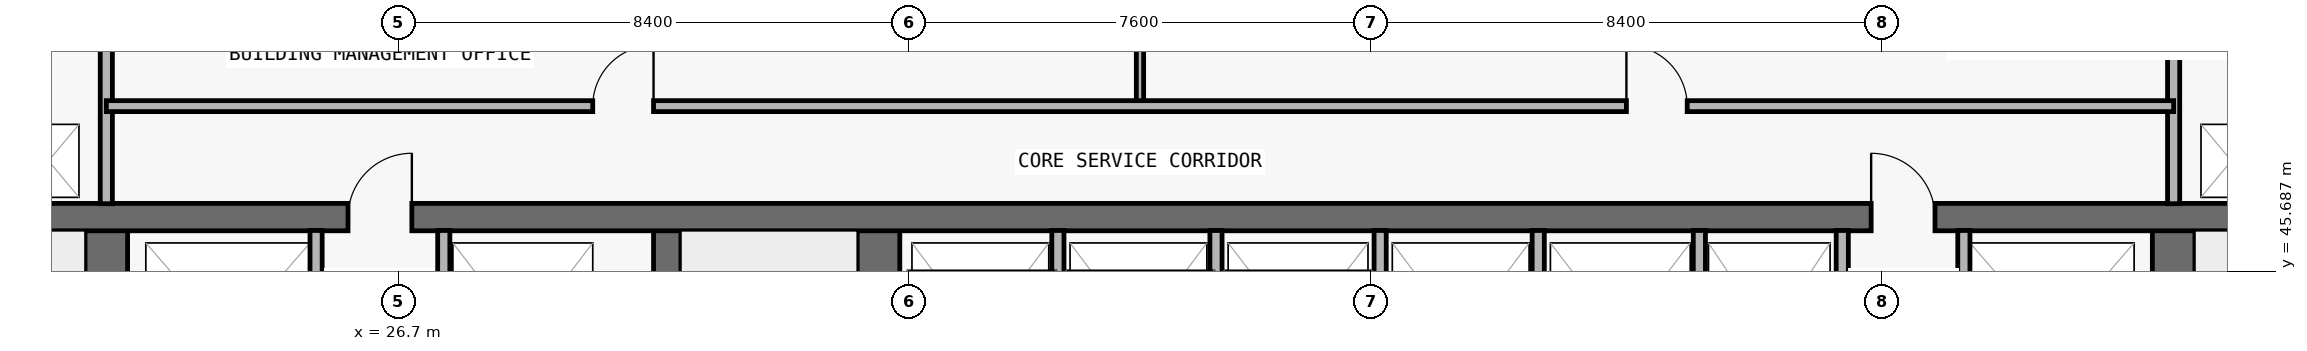
"""IFC4 building model, lengths in metres.
Left out: names, types, materials, properties, quantities, classifications, styles, units other than length and angle.
Written with IfcOpenShell. Run it as: python <this file> out.ifc"""

import sys

from ifc_helpers import new_model, si_unit, direction, frame, frame_2d, origin, place, context, subcontext, project, spatial, rectangle, extrude, element, fill, save


model = new_model("IFC4")
c1 = context("Model", 3, precision=1e-05, world=origin(), true_north=direction((0.0, 1.0)))
c2 = subcontext(c1, "Body", "Model", "MODEL_VIEW")
j1 = project(units=[si_unit("LENGTHUNIT", "METRE"), si_unit("PLANEANGLEUNIT", "RADIAN")], contexts=[c1])
p1 = place(None, origin())
s1 = spatial("IfcSite", under=j1, at=p1, CompositionType="ELEMENT")
p2 = place(p1, origin())
s2 = spatial("IfcBuilding", under=s1, at=p2, CompositionType="ELEMENT")
p3 = place(p2, frame((0.0, 0.0, 94.5)))
s3 = spatial("IfcBuildingStorey", under=s2, at=p3, CompositionType="ELEMENT", Elevation=94.5)
p4 = place(p3, frame((21.9, 36.95, 0.0), z_axis=(0.0, 0.0, 1.0), x_axis=(0.0, 1.0, 0.0)))
e1 = element("IfcWall", 1, at=p4, inside=s3, PredefinedType="SHEAR", context=c2, shape_type="SweptSolid", body=[
    extrude(rectangle(XDim=9.625, YDim=0.7, at=frame_2d((4.812, 0.0))), origin(), (0.0, 0.0, 1.0), 3.0),
])
p5 = place(p4, frame((0.6, 0.0, 0.0)))
e2 = element("IfcOpeningElement", 2, at=p5, cuts=e1, PredefinedType="OPENING", context=c2, shape_type="SweptSolid", body=[
    extrude(rectangle(XDim=1.1, YDim=2.15, at=frame_2d((0.55, 1.075))), frame((0.0, 0.36, 0.0), z_axis=(0.0, -1.0, 0.0), x_axis=(1.0, 0.0, 0.0)), (0.0, 0.0, 1.0), 0.72),
])
p6 = place(p3, frame((55.9, 36.95, 0.0), z_axis=(0.0, 0.0, 1.0), x_axis=(0.0, 1.0, 0.0)))
e3 = element("IfcWall", 3, at=p6, inside=s3, PredefinedType="SHEAR", context=c2, shape_type="SweptSolid", body=[
    extrude(rectangle(XDim=9.625, YDim=0.7, at=frame_2d((4.812, 0.0))), origin(), (0.0, 0.0, 1.0), 3.0),
])
p7 = place(p6, frame((0.6, 0.0, 0.0)))
e4 = element("IfcOpeningElement", 4, at=p7, cuts=e3, PredefinedType="OPENING", context=c2, shape_type="SweptSolid", body=[
    extrude(rectangle(XDim=1.1, YDim=2.15, at=frame_2d((0.55, 1.075))), frame((0.0, 0.36, 0.0), z_axis=(0.0, -1.0, 0.0), x_axis=(1.0, 0.0, 0.0)), (0.0, 0.0, 1.0), 0.72),
])
p8 = place(p3, frame((31.125, 36.95, 0.0), z_axis=(0.0, 0.0, 1.0), x_axis=(0.0, 1.0, 0.0)))
e5 = element("IfcWall", 5, at=p8, inside=s3, PredefinedType="SHEAR", context=c2, shape_type="SweptSolid", body=[
    extrude(rectangle(XDim=9.625, YDim=0.45, at=frame_2d((4.812, 0.0))), origin(), (0.0, 0.0, 1.0), 3.0),
])
p9 = place(p3, frame((34.6, 36.95, 0.0), z_axis=(0.0, 0.0, 1.0), x_axis=(0.0, 1.0, 0.0)))
e6 = element("IfcWall", 6, at=p9, inside=s3, PredefinedType="SHEAR", context=c2, shape_type="SweptSolid", body=[
    extrude(rectangle(XDim=9.625, YDim=0.7, at=frame_2d((4.812, 0.0))), origin(), (0.0, 0.0, 1.0), 3.0),
])
p10 = place(p3, frame((18.25, 46.575, 0.0), z_axis=(0.0, 0.0, 1.0), x_axis=(1.0, 0.0, 0.0)))
e7 = element("IfcWall", 7, at=p10, inside=s3, PredefinedType="SHEAR", context=c2, shape_type="SweptSolid", body=[
    extrude(rectangle(XDim=41.3, YDim=0.45, at=frame_2d((20.65, 0.0))), origin(), (0.0, 0.0, 1.0), 3.0),
])
p11 = place(p10, frame((7.625, 0.0, 0.0)))
e8 = element("IfcOpeningElement", 8, at=p11, cuts=e7, PredefinedType="OPENING", context=c2, shape_type="SweptSolid", body=[
    extrude(rectangle(XDim=1.05, YDim=2.15, at=frame_2d((0.525, 1.075))), frame((0.0, 0.235, 0.0), z_axis=(0.0, -1.0, 0.0), x_axis=(1.0, 0.0, 0.0)), (0.0, 0.0, 1.0), 0.47),
])
p12 = place(p10, frame((32.675, 0.0, 0.0)))
e9 = element("IfcOpeningElement", 9, at=p12, cuts=e7, PredefinedType="OPENING", context=c2, shape_type="SweptSolid", body=[
    extrude(rectangle(XDim=1.05, YDim=2.15, at=frame_2d((0.525, 1.075))), frame((0.0, 0.235, 0.0), z_axis=(0.0, -1.0, 0.0), x_axis=(1.0, 0.0, 0.0)), (0.0, 0.0, 1.0), 0.47),
])
p13 = place(p3, frame((21.9, 46.795, 0.0), z_axis=(0.0, 0.0, 1.0), x_axis=(0.0, 1.0, 0.0)))
e10 = element("IfcWall", 10, at=p13, inside=s3, PredefinedType="PARTITIONING", context=c2, shape_type="SweptSolid", body=[
    extrude(rectangle(XDim=3.06, YDim=0.2, at=frame_2d((1.53, 0.0))), origin(), (0.0, 0.0, 1.0), 3.0),
])
for number, where, z_axis, x_axis in (
    (11, (25.35, 43.17, 0.0), (0.0, 0.0, 1.0), (0.0, 1.0, 0.0)),
    (12, (27.45, 43.17, 0.0), (0.0, 0.0, 1.0), (0.0, 1.0, 0.0)),
    (13, (37.55, 43.17, 0.0), (0.0, 0.0, 1.0), (0.0, 1.0, 0.0)),
):
    element("IfcWall", number, at=place(p3, frame(where, z_axis=z_axis, x_axis=x_axis)), inside=s3, PredefinedType="PARTITIONING", context=c2, shape_type="SweptSolid", body=[
        extrude(rectangle(XDim=3.185, YDim=0.2, at=frame_2d((1.593, 0.0))), origin(), (0.0, 0.0, 1.0), 3.0),
    ])
p14 = place(p3, frame((38.9, 48.4, 0.0), z_axis=(0.0, 0.0, 1.0), x_axis=(0.0, 1.0, 0.0)))
e14 = element("IfcWall", 14, at=p14, inside=s3, PredefinedType="PARTITIONING", context=c2, shape_type="SweptSolid", body=[
    extrude(rectangle(XDim=1.455, YDim=0.12, at=frame_2d((0.728, 0.0))), origin(), (0.0, 0.0, 1.0), 3.0),
])
for number, where, z_axis, x_axis in (
    (15, (40.15, 43.17, 0.0), (0.0, 0.0, 1.0), (0.0, 1.0, 0.0)),
    (16, (42.85, 43.17, 0.0), (0.0, 0.0, 1.0), (0.0, 1.0, 0.0)),
    (17, (45.45, 43.17, 0.0), (0.0, 0.0, 1.0), (0.0, 1.0, 0.0)),
    (18, (48.1, 43.17, 0.0), (0.0, 0.0, 1.0), (0.0, 1.0, 0.0)),
    (19, (50.45, 43.17, 0.0), (0.0, 0.0, 1.0), (0.0, 1.0, 0.0)),
    (20, (52.45, 43.17, 0.0), (0.0, 0.0, 1.0), (0.0, 1.0, 0.0)),
):
    element("IfcWall", number, at=place(p3, frame(where, z_axis=z_axis, x_axis=x_axis)), inside=s3, PredefinedType="PARTITIONING", context=c2, shape_type="SweptSolid", body=[
        extrude(rectangle(XDim=3.185, YDim=0.2, at=frame_2d((1.593, 0.0))), origin(), (0.0, 0.0, 1.0), 3.0),
    ])
p15 = place(p3, frame((55.9, 46.795, 0.0), z_axis=(0.0, 0.0, 1.0), x_axis=(0.0, 1.0, 0.0)))
e21 = element("IfcWall", 21, at=p15, inside=s3, PredefinedType="PARTITIONING", context=c2, shape_type="SweptSolid", body=[
    extrude(rectangle(XDim=3.06, YDim=0.2, at=frame_2d((1.53, 0.0))), origin(), (0.0, 0.0, 1.0), 3.0),
])
p16 = place(p3, frame((21.9, 48.4, 0.0), z_axis=(0.0, 0.0, 1.0), x_axis=(1.0, 0.0, 0.0)))
e22 = element("IfcWall", 22, at=p16, inside=s3, PredefinedType="PARTITIONING", context=c2, shape_type="SweptSolid", body=[
    extrude(rectangle(XDim=34.0, YDim=0.18, at=frame_2d((17.0, 0.0))), origin(), (0.0, 0.0, 1.0), 3.0),
])
p17 = place(p16, frame((8.0, 0.0, 0.0)))
e23 = element("IfcOpeningElement", 23, at=p17, cuts=e22, PredefinedType="OPENING", context=c2, shape_type="SweptSolid", body=[
    extrude(rectangle(XDim=1.0, YDim=2.2, at=frame_2d((0.5, 1.1))), frame((0.0, 0.1, 0.0), z_axis=(0.0, -1.0, 0.0), x_axis=(1.0, 0.0, 0.0)), (0.0, 0.0, 1.0), 0.2),
])
p18 = place(p16, frame((25.0, 0.0, 0.0)))
e24 = element("IfcOpeningElement", 24, at=p18, cuts=e22, PredefinedType="OPENING", context=c2, shape_type="SweptSolid", body=[
    extrude(rectangle(XDim=1.0, YDim=2.2, at=frame_2d((0.5, 1.1))), frame((0.0, 0.1, 0.0), z_axis=(0.0, -1.0, 0.0), x_axis=(1.0, 0.0, 0.0)), (0.0, 0.0, 1.0), 0.2),
])
p19 = place(p11, origin())
e25 = element("IfcDoor", 25, at=p19, inside=s3, OperationType="SINGLE_SWING_RIGHT", PredefinedType="DOOR", context=c2, shape_type="SweptSolid", body=[
    extrude(rectangle(XDim=1.05, YDim=2.15, at=frame_2d((0.525, 1.075))), frame((0.0, 0.025, 0.0), z_axis=(0.0, -1.0, 0.0), x_axis=(1.0, 0.0, 0.0)), (0.0, 0.0, 1.0), 0.05),
])
fill(e8, e25)
p20 = place(p12, origin())
e26 = element("IfcDoor", 26, at=p20, inside=s3, OperationType="SINGLE_SWING_LEFT", PredefinedType="DOOR", context=c2, shape_type="SweptSolid", body=[
    extrude(rectangle(XDim=1.05, YDim=2.15, at=frame_2d((0.525, 1.075))), frame((0.0, 0.025, 0.0), z_axis=(0.0, -1.0, 0.0), x_axis=(1.0, 0.0, 0.0)), (0.0, 0.0, 1.0), 0.05),
])
fill(e9, e26)
p21 = place(p17, origin())
e27 = element("IfcDoor", 27, at=p21, inside=s3, OperationType="SINGLE_SWING_RIGHT", PredefinedType="DOOR", context=c2, shape_type="SweptSolid", body=[
    extrude(rectangle(XDim=1.0, YDim=2.2, at=frame_2d((0.5, 1.1))), frame((0.0, 0.025, 0.0), z_axis=(0.0, -1.0, 0.0), x_axis=(1.0, 0.0, 0.0)), (0.0, 0.0, 1.0), 0.05),
])
fill(e23, e27)
p22 = place(p18, origin())
e28 = element("IfcDoor", 28, at=p22, inside=s3, OperationType="SINGLE_SWING_LEFT", PredefinedType="DOOR", context=c2, shape_type="SweptSolid", body=[
    extrude(rectangle(XDim=1.0, YDim=2.2, at=frame_2d((0.5, 1.1))), frame((0.0, 0.025, 0.0), z_axis=(0.0, -1.0, 0.0), x_axis=(1.0, 0.0, 0.0)), (0.0, 0.0, 1.0), 0.05),
])
fill(e24, e28)
save(model, sys.argv[1])
